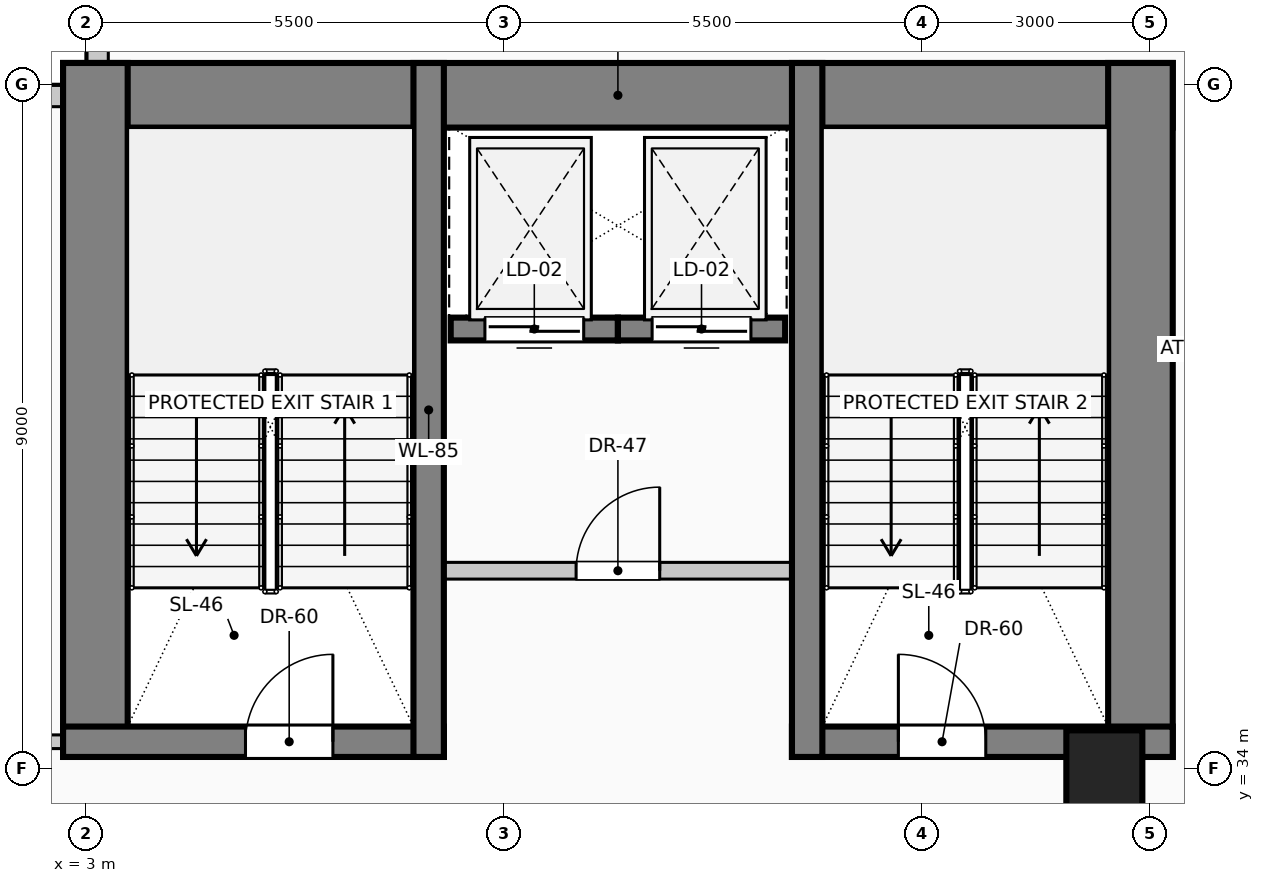
"""IFC4 building model, lengths in metres.
Left out: names, types, materials, properties, quantities, classifications, styles, units other than length and angle.
Written with IfcOpenShell. Run it as: python <this file> out.ifc"""

import sys

from ifc_helpers import new_model, si_unit, direction, frame, frame_2d, origin, origin_2d, place, context, subcontext, project, spatial, rectangle, circle, extrude, element, fill, save


model = new_model("IFC4")
c1 = context("Model", 3, precision=1e-05, world=origin(), true_north=direction((0.0, 1.0)))
c2 = subcontext(c1, "Body", "Model", "MODEL_VIEW")
j1 = project(units=[si_unit("LENGTHUNIT", "METRE"), si_unit("PLANEANGLEUNIT", "RADIAN")], contexts=[c1])
p1 = place(None, origin())
s1 = spatial("IfcSite", under=j1, at=p1, CompositionType="ELEMENT")
p2 = place(p1, origin())
s2 = spatial("IfcBuilding", under=s1, at=p2, CompositionType="ELEMENT")
p3 = place(p2, frame((0.0, 0.0, 136.6)))
s3 = spatial("IfcBuildingStorey", under=s2, at=p3, CompositionType="ELEMENT", Elevation=136.6)
p4 = place(p3, frame((2.7, 42.855, 0.0), z_axis=(0.0, 0.0, 1.0), x_axis=(1.0, 0.0, 0.0)))
e1 = element("IfcWall", 1, at=p4, inside=s3, PredefinedType="SHEAR", context=c2, shape_type="SweptSolid", body=[
    extrude(rectangle(XDim=14.6, YDim=0.85, at=frame_2d((7.3, 0.0))), origin(), (0.0, 0.0, 1.0), 4.0),
])
for number, where, z_axis, x_axis in (
    (2, (3.125, 34.15, 0.0), (0.0, 0.0, 1.0), (0.0, 1.0, 0.0)),
    (3, (16.875, 34.15, 0.0), (0.0, 0.0, 1.0), (0.0, 1.0, 0.0)),
):
    element("IfcWall", number, at=place(p3, frame(where, z_axis=z_axis, x_axis=x_axis)), inside=s3, PredefinedType="SHEAR", context=c2, shape_type="SweptSolid", body=[
        extrude(rectangle(XDim=9.13, YDim=0.85, at=frame_2d((4.565, 0.0))), origin(), (0.0, 0.0, 1.0), 4.0),
    ])
p5 = place(p3, frame((2.7, 34.35, 0.0), z_axis=(0.0, 0.0, 1.0), x_axis=(1.0, 0.0, 0.0)))
e4 = element("IfcWall", 4, at=p5, inside=s3, PredefinedType="SHEAR", context=c2, shape_type="SweptSolid", body=[
    extrude(rectangle(XDim=5.01, YDim=0.4, at=frame_2d((2.505, 0.0))), origin(), (0.0, 0.0, 1.0), 4.0),
])
p6 = place(p5, frame((2.4, 0.0, 0.0)))
e5 = element("IfcOpeningElement", 5, at=p6, cuts=e4, PredefinedType="OPENING", context=c2, shape_type="SweptSolid", body=[
    extrude(rectangle(XDim=1.15, YDim=2.2, at=frame_2d((0.575, 1.1))), frame((0.0, 0.21, 0.0), z_axis=(0.0, -1.0, 0.0), x_axis=(1.0, 0.0, 0.0)), (0.0, 0.0, 1.0), 0.42),
])
p7 = place(p3, frame((12.29, 34.35, 0.0), z_axis=(0.0, 0.0, 1.0), x_axis=(1.0, 0.0, 0.0)))
e6 = element("IfcWall", 6, at=p7, inside=s3, PredefinedType="SHEAR", context=c2, shape_type="SweptSolid", body=[
    extrude(rectangle(XDim=5.01, YDim=0.4, at=frame_2d((2.505, 0.0))), origin(), (0.0, 0.0, 1.0), 4.0),
])
p8 = place(p7, frame((1.4, 0.0, 0.0)))
e7 = element("IfcOpeningElement", 7, at=p8, cuts=e6, PredefinedType="OPENING", context=c2, shape_type="SweptSolid", body=[
    extrude(rectangle(XDim=1.15, YDim=2.2, at=frame_2d((0.575, 1.1))), frame((0.0, 0.21, 0.0), z_axis=(0.0, -1.0, 0.0), x_axis=(1.0, 0.0, 0.0)), (0.0, 0.0, 1.0), 0.42),
])
for number, where, z_axis, x_axis in (
    (8, (7.51, 34.15, 0.0), (0.0, 0.0, 1.0), (0.0, 1.0, 0.0)),
    (9, (12.49, 34.15, 0.0), (0.0, 0.0, 1.0), (0.0, 1.0, 0.0)),
):
    element("IfcWall", number, at=place(p3, frame(where, z_axis=z_axis, x_axis=x_axis)), inside=s3, PredefinedType="SHEAR", context=c2, shape_type="SweptSolid", body=[
        extrude(rectangle(XDim=9.13, YDim=0.4, at=frame_2d((4.565, 0.0))), origin(), (0.0, 0.0, 1.0), 4.0),
    ])
p9 = place(p3, frame((16.4, 34.0, 0.0), z_axis=(0.0, 0.0, 1.0), x_axis=(1.0, 0.0, 0.0)))
e10 = element("IfcColumn", 10, at=p9, inside=s3, PredefinedType="COLUMN", context=c2, shape_type="SweptSolid", body=[
    extrude(circle(Radius=0.5, at=origin_2d()), origin(), (0.0, 0.0, 1.0), 4.0),
])
p10 = place(p3, frame((0.6, 42.845, 0.0), z_axis=(0.0, 0.0, 1.0), x_axis=(1.0, 0.0, 0.0)))
e11 = element("IfcWall", 11, at=p10, inside=s3, PredefinedType="SOLIDWALL", context=c2, shape_type="SweptSolid", body=[
    extrude(rectangle(XDim=2.095, YDim=0.28, at=frame_2d((1.047, 0.0))), origin(), (0.0, 0.0, 1.0), 3.725),
])
p11 = place(p3, frame((3.155, 43.285, 0.0), z_axis=(0.0, 0.0, 1.0), x_axis=(0.0, 1.0, 0.0)))
e12 = element("IfcWall", 12, at=p11, inside=s3, PredefinedType="SOLIDWALL", context=c2, shape_type="SweptSolid", body=[
    extrude(rectangle(XDim=2.115, YDim=0.28, at=frame_2d((1.058, 0.0))), origin(), (0.0, 0.0, 1.0), 3.725),
])
p12 = place(p3, frame((10.0, 39.78, 0.0), z_axis=(0.0, 0.0, 1.0), x_axis=(-1.0, 0.0, 0.0)))
e13 = element("IfcWall", 13, at=p12, inside=s3, PredefinedType="SOLIDWALL", context=c2, shape_type="SweptSolid", body=[
    extrude(rectangle(XDim=2.2, YDim=0.3, at=frame_2d((1.1, 0.0))), origin(), (0.0, 0.0, 1.0), 4.0),
])
p13 = place(p12, frame((0.45, 0.0, 0.0)))
e14 = element("IfcOpeningElement", 14, at=p13, cuts=e13, PredefinedType="OPENING", context=c2, shape_type="SweptSolid", body=[
    extrude(rectangle(XDim=1.3, YDim=2.25, at=frame_2d((0.65, 1.125))), frame((0.0, 0.16, 0.0), z_axis=(0.0, -1.0, 0.0), x_axis=(1.0, 0.0, 0.0)), (0.0, 0.0, 1.0), 0.32),
])
p14 = place(p3, frame((12.2, 39.78, 0.0), z_axis=(0.0, 0.0, 1.0), x_axis=(-1.0, 0.0, 0.0)))
e15 = element("IfcWall", 15, at=p14, inside=s3, PredefinedType="SOLIDWALL", context=c2, shape_type="SweptSolid", body=[
    extrude(rectangle(XDim=2.2, YDim=0.3, at=frame_2d((1.1, 0.0))), origin(), (0.0, 0.0, 1.0), 4.0),
])
p15 = place(p14, frame((0.45, 0.0, 0.0)))
e16 = element("IfcOpeningElement", 16, at=p15, cuts=e15, PredefinedType="OPENING", context=c2, shape_type="SweptSolid", body=[
    extrude(rectangle(XDim=1.3, YDim=2.25, at=frame_2d((0.65, 1.125))), frame((0.0, 0.16, 0.0), z_axis=(0.0, -1.0, 0.0), x_axis=(1.0, 0.0, 0.0)), (0.0, 0.0, 1.0), 0.32),
])
p16 = place(p3, frame((7.51, 36.6, 0.0), z_axis=(0.0, 0.0, 1.0), x_axis=(1.0, 0.0, 0.0)))
e17 = element("IfcWall", 17, at=p16, inside=s3, PredefinedType="PARTITIONING", context=c2, shape_type="SweptSolid", body=[
    extrude(rectangle(XDim=4.98, YDim=0.22, at=frame_2d((2.49, 0.0))), origin(), (0.0, 0.0, 1.0), 3.725),
])
p17 = place(p16, frame((1.94, 0.0, 0.0)))
e18 = element("IfcOpeningElement", 18, at=p17, cuts=e17, PredefinedType="OPENING", context=c2, shape_type="SweptSolid", body=[
    extrude(rectangle(XDim=1.1, YDim=2.2, at=frame_2d((0.55, 1.1))), frame((0.0, 0.12, 0.0), z_axis=(0.0, -1.0, 0.0), x_axis=(1.0, 0.0, 0.0)), (0.0, 0.0, 1.0), 0.24),
])
p18 = place(p3, frame((1.175, 34.35, 0.0), z_axis=(0.0, 0.0, 1.0), x_axis=(1.0, 0.0, 0.0)))
e19 = element("IfcWall", 19, at=p18, inside=s3, PredefinedType="PARTITIONING", context=c2, shape_type="SweptSolid", body=[
    extrude(rectangle(XDim=1.525, YDim=0.18, at=frame_2d((0.762, 0.0))), origin(), (0.0, 0.0, 1.0), 3.725),
])
p19 = place(p13, origin())
e20 = element("IfcDoor", 20, at=p19, inside=s3, OperationType="SLIDING_TO_LEFT", PredefinedType="DOOR", context=c2, shape_type="SweptSolid", body=[
    extrude(rectangle(XDim=1.3, YDim=2.25, at=frame_2d((0.65, 1.125))), frame((0.0, 0.025, 0.0), z_axis=(0.0, -1.0, 0.0), x_axis=(1.0, 0.0, 0.0)), (0.0, 0.0, 1.0), 0.05),
])
fill(e14, e20)
p20 = place(p15, origin())
e21 = element("IfcDoor", 21, at=p20, inside=s3, OperationType="SLIDING_TO_RIGHT", PredefinedType="DOOR", context=c2, shape_type="SweptSolid", body=[
    extrude(rectangle(XDim=1.3, YDim=2.25, at=frame_2d((0.65, 1.125))), frame((0.0, 0.025, 0.0), z_axis=(0.0, -1.0, 0.0), x_axis=(1.0, 0.0, 0.0)), (0.0, 0.0, 1.0), 0.05),
])
fill(e16, e21)
p21 = place(p6, origin())
e22 = element("IfcDoor", 22, at=p21, inside=s3, OperationType="SINGLE_SWING_RIGHT", PredefinedType="DOOR", context=c2, shape_type="SweptSolid", body=[
    extrude(rectangle(XDim=1.15, YDim=2.2, at=frame_2d((0.575, 1.1))), frame((0.0, 0.025, 0.0), z_axis=(0.0, -1.0, 0.0), x_axis=(1.0, 0.0, 0.0)), (0.0, 0.0, 1.0), 0.05),
])
fill(e5, e22)
p22 = place(p8, origin())
e23 = element("IfcDoor", 23, at=p22, inside=s3, OperationType="SINGLE_SWING_LEFT", PredefinedType="DOOR", context=c2, shape_type="SweptSolid", body=[
    extrude(rectangle(XDim=1.15, YDim=2.2, at=frame_2d((0.575, 1.1))), frame((0.0, 0.025, 0.0), z_axis=(0.0, -1.0, 0.0), x_axis=(1.0, 0.0, 0.0)), (0.0, 0.0, 1.0), 0.05),
])
fill(e7, e23)
p23 = place(p17, origin())
e24 = element("IfcDoor", 24, at=p23, inside=s3, OperationType="SINGLE_SWING_RIGHT", PredefinedType="DOOR", context=c2, shape_type="SweptSolid", body=[
    extrude(rectangle(XDim=1.1, YDim=2.2, at=frame_2d((0.55, 1.1))), frame((0.0, 0.025, 0.0), z_axis=(0.0, -1.0, 0.0), x_axis=(1.0, 0.0, 0.0)), (0.0, 0.0, 1.0), 0.05),
])
fill(e18, e24)
save(model, sys.argv[1])
